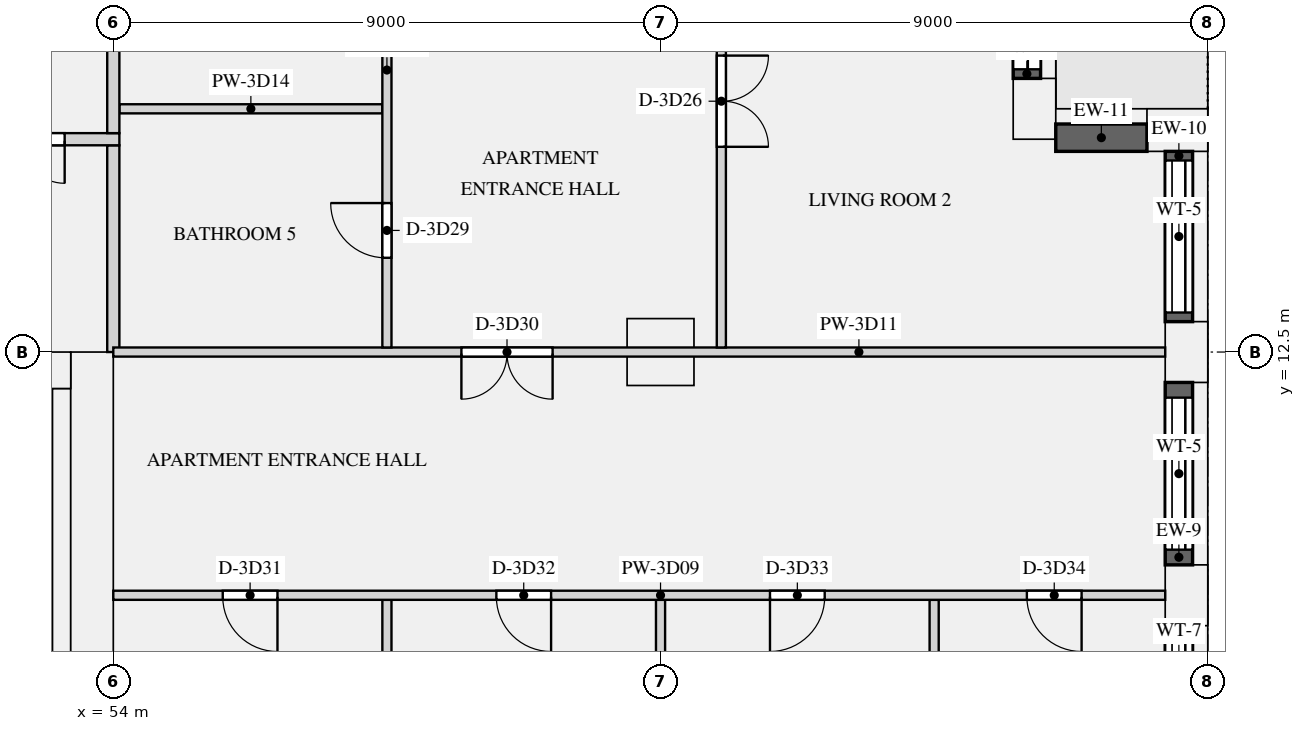
"""IFC4 building model, lengths in metres.
Left out: names, types, materials, properties, quantities, classifications, styles, units other than length and angle.
Written with IfcOpenShell. Run it as: python <this file> out.ifc"""

import sys

from ifc_helpers import new_model, si_unit, direction, frame, frame_2d, origin, origin_2d, place, context, subcontext, project, spatial, rectangle, extrude, element, fill, save


model = new_model("IFC4")
c1 = context("Model", 3, precision=1e-05, world=origin(), true_north=direction((0.0, 1.0)))
c2 = subcontext(c1, "Body", "Model", "MODEL_VIEW")
j1 = project(units=[si_unit("LENGTHUNIT", "METRE"), si_unit("PLANEANGLEUNIT", "RADIAN")], contexts=[c1])
p1 = place(None, origin())
s1 = spatial("IfcSite", under=j1, at=p1, CompositionType="ELEMENT")
p2 = place(p1, origin())
s2 = spatial("IfcBuilding", under=s1, at=p2, CompositionType="ELEMENT")
p3 = place(p2, frame((0.0, 0.0, 166.5)))
s3 = spatial("IfcBuildingStorey", under=s2, at=p3, CompositionType="ELEMENT", Elevation=166.5)
for number, where, z_axis, x_axis in (
    (1, (71.65, 8.5, 0.0), (0.0, 0.0, 1.0), (0.0, 1.0, 0.0)),
    (2, (71.65, 12.5, 0.0), (0.0, 0.0, 1.0), (0.0, 1.0, 0.0)),
    (3, (71.5, 16.15, 0.0), (0.0, 0.0, 1.0), (-1.0, 0.0, 0.0)),
    (4, (69.15, 16.5, 0.0), (0.0, 0.0, 1.0), (0.0, 1.0, 0.0)),
):
    element("IfcColumn", number, at=place(p3, frame(where, z_axis=z_axis, x_axis=x_axis)), inside=s3, PredefinedType="USERDEFINED", context=c2, shape_type="SweptSolid", body=[
        extrude(rectangle(XDim=1.0, YDim=0.7, at=origin_2d()), origin(), (0.0, 0.0, 1.0), 3.15),
    ])
p4 = place(p3, frame((63.0, 12.5, 0.0), z_axis=(0.0, 0.0, 1.0), x_axis=(1.0, 0.0, 0.0)))
e5 = element("IfcColumn", 5, at=p4, inside=s3, PredefinedType="COLUMN", context=c2, shape_type="SweptSolid", body=[
    extrude(rectangle(XDim=1.1, YDim=1.1, at=origin_2d()), origin(), (0.0, 0.0, 1.0), 3.15),
])
p5 = place(p3, frame((53.65, 0.0, 0.0), z_axis=(0.0, 0.0, 1.0), x_axis=(0.0, 1.0, 0.0)))
e6 = element("IfcWall", 6, at=p5, inside=s3, PredefinedType="SHEAR", context=c2, shape_type="SweptSolid", body=[
    extrude(rectangle(XDim=12.5, YDim=0.7, at=frame_2d((6.25, 0.0))), origin(), (0.0, 0.0, 1.0), 3.15),
])
p6 = place(p3, frame((18.7, 12.2, 0.0), z_axis=(0.0, 0.0, 1.0), x_axis=(1.0, 0.0, 0.0)))
e7 = element("IfcWall", 7, at=p6, inside=s3, PredefinedType="SHEAR", context=c2, shape_type="SweptSolid", body=[
    extrude(rectangle(XDim=34.6, YDim=0.6, at=frame_2d((17.3, 0.0))), origin(), (0.0, 0.0, 1.0), 3.15),
])
p7 = place(p6, frame((24.475, 0.0, 0.0)))
e8 = element("IfcOpeningElement", 8, at=p7, cuts=e7, PredefinedType="OPENING", context=c2, shape_type="SweptSolid", body=[
    extrude(rectangle(XDim=1.1, YDim=2.1, at=frame_2d((0.55, 1.05))), frame((0.0, 0.31, 0.0), z_axis=(0.0, -1.0, 0.0), x_axis=(1.0, 0.0, 0.0)), (0.0, 0.0, 1.0), 0.62),
])
p8 = place(p6, frame((26.725, 0.0, 0.0)))
e9 = element("IfcOpeningElement", 9, at=p8, cuts=e7, PredefinedType="OPENING", context=c2, shape_type="SweptSolid", body=[
    extrude(rectangle(XDim=1.1, YDim=2.1, at=frame_2d((0.55, 1.05))), frame((0.0, 0.31, 0.0), z_axis=(0.0, -1.0, 0.0), x_axis=(1.0, 0.0, 0.0)), (0.0, 0.0, 1.0), 0.62),
])
p9 = place(p6, frame((28.975, 0.0, 0.0)))
e10 = element("IfcOpeningElement", 10, at=p9, cuts=e7, PredefinedType="OPENING", context=c2, shape_type="SweptSolid", body=[
    extrude(rectangle(XDim=1.1, YDim=2.1, at=frame_2d((0.55, 1.05))), frame((0.0, 0.31, 0.0), z_axis=(0.0, -1.0, 0.0), x_axis=(1.0, 0.0, 0.0)), (0.0, 0.0, 1.0), 0.62),
])
p10 = place(p6, frame((8.85, 0.0, 0.0)))
e11 = element("IfcOpeningElement", 11, at=p10, cuts=e7, PredefinedType="OPENING", context=c2, shape_type="SweptSolid", body=[
    extrude(rectangle(XDim=0.9, YDim=2.1, at=frame_2d((0.45, 1.05))), frame((0.0, 0.31, 0.0), z_axis=(0.0, -1.0, 0.0), x_axis=(1.0, 0.0, 0.0)), (0.0, 0.0, 1.0), 0.62),
])
p11 = place(p6, frame((1.45, 0.0, 0.0)))
e12 = element("IfcOpeningElement", 12, at=p11, cuts=e7, PredefinedType="OPENING", context=c2, shape_type="SweptSolid", body=[
    extrude(rectangle(XDim=1.2, YDim=2.1, at=frame_2d((0.6, 1.05))), frame((0.0, 0.31, 0.0), z_axis=(0.0, -1.0, 0.0), x_axis=(1.0, 0.0, 0.0)), (0.0, 0.0, 1.0), 0.62),
])
p12 = place(p6, frame((31.95, 0.0, 0.0)))
e13 = element("IfcOpeningElement", 13, at=p12, cuts=e7, PredefinedType="OPENING", context=c2, shape_type="SweptSolid", body=[
    extrude(rectangle(XDim=1.2, YDim=2.1, at=frame_2d((0.6, 1.05))), frame((0.0, 0.31, 0.0), z_axis=(0.0, -1.0, 0.0), x_axis=(1.0, 0.0, 0.0)), (0.0, 0.0, 1.0), 0.62),
])
p13 = place(p3, frame((53.15, 1.0, 0.0), z_axis=(0.0, 0.0, 1.0), x_axis=(0.0, 1.0, 0.0)))
e14 = element("IfcWall", 14, at=p13, inside=s3, PredefinedType="SHEAR", context=c2, shape_type="SweptSolid", body=[
    extrude(rectangle(XDim=10.9, YDim=0.3, at=frame_2d((5.45, 0.0))), origin(), (0.0, 0.0, 1.0), 3.15),
])
p14 = place(p3, frame((71.525, 5.5, 0.9), z_axis=(0.0, 0.0, 1.0), x_axis=(0.0, 1.0, 0.0)))
e15 = element("IfcWall", 15, at=p14, inside=s3, PredefinedType="SOLIDWALL", context=c2, shape_type="SweptSolid", body=[
    extrude(rectangle(XDim=2.5, YDim=0.45, at=frame_2d((1.25, 0.0))), origin(), (0.0, 0.0, 1.0), 1.93),
])
p15 = place(p14, frame((0.25, 0.0, 0.15)))
e16 = element("IfcOpeningElement", 16, at=p15, cuts=e15, PredefinedType="OPENING", context=c2, shape_type="SweptSolid", body=[
    extrude(rectangle(XDim=2.0, YDim=1.5, at=frame_2d((1.0, 0.75))), frame((0.0, 0.235, 0.0), z_axis=(0.0, -1.0, 0.0), x_axis=(1.0, 0.0, 0.0)), (0.0, 0.0, 1.0), 0.47),
])
p16 = place(p3, frame((71.525, 9.0, 0.9), z_axis=(0.0, 0.0, 1.0), x_axis=(0.0, 1.0, 0.0)))
e17 = element("IfcWall", 17, at=p16, inside=s3, PredefinedType="SOLIDWALL", context=c2, shape_type="SweptSolid", body=[
    extrude(rectangle(XDim=3.0, YDim=0.45, at=frame_2d((1.5, 0.0))), origin(), (0.0, 0.0, 1.0), 1.93),
])
p17 = place(p16, frame((0.25, 0.0, 0.15)))
e18 = element("IfcOpeningElement", 18, at=p17, cuts=e17, PredefinedType="OPENING", context=c2, shape_type="SweptSolid", body=[
    extrude(rectangle(XDim=2.5, YDim=1.5, at=frame_2d((1.25, 0.75))), frame((0.0, 0.235, 0.0), z_axis=(0.0, -1.0, 0.0), x_axis=(1.0, 0.0, 0.0)), (0.0, 0.0, 1.0), 0.47),
])
p18 = place(p3, frame((71.525, 13.0, 0.9), z_axis=(0.0, 0.0, 1.0), x_axis=(0.0, 1.0, 0.0)))
e19 = element("IfcWall", 19, at=p18, inside=s3, PredefinedType="SOLIDWALL", context=c2, shape_type="SweptSolid", body=[
    extrude(rectangle(XDim=2.8, YDim=0.45, at=frame_2d((1.4, 0.0))), origin(), (0.0, 0.0, 1.0), 1.93),
])
p19 = place(p18, frame((0.15, 0.0, 0.15)))
e20 = element("IfcOpeningElement", 20, at=p19, cuts=e19, PredefinedType="OPENING", context=c2, shape_type="SweptSolid", body=[
    extrude(rectangle(XDim=2.5, YDim=1.5, at=frame_2d((1.25, 0.75))), frame((0.0, 0.235, 0.0), z_axis=(0.0, -1.0, 0.0), x_axis=(1.0, 0.0, 0.0)), (0.0, 0.0, 1.0), 0.47),
])
p20 = place(p3, frame((71.0, 16.025, 0.9), z_axis=(0.0, 0.0, 1.0), x_axis=(-1.0, 0.0, 0.0)))
e21 = element("IfcWall", 21, at=p20, inside=s3, PredefinedType="SOLIDWALL", context=c2, shape_type="SweptSolid", body=[
    extrude(rectangle(XDim=1.5, YDim=0.45, at=frame_2d((0.75, 0.0))), origin(), (0.0, 0.0, 1.0), 1.93),
])
p21 = place(p3, frame((69.025, 17.0, 0.0), z_axis=(0.0, 0.0, 1.0), x_axis=(0.0, 1.0, 0.0)))
e22 = element("IfcWall", 22, at=p21, inside=s3, PredefinedType="SOLIDWALL", context=c2, shape_type="SweptSolid", body=[
    extrude(rectangle(XDim=3.0, YDim=0.45, at=frame_2d((1.5, 0.0))), origin(), (0.0, 0.0, 1.0), 2.83),
])
p22 = place(p21, frame((0.15, 0.0, 0.0)))
e23 = element("IfcOpeningElement", 23, at=p22, cuts=e22, PredefinedType="OPENING", context=c2, shape_type="SweptSolid", body=[
    extrude(rectangle(XDim=2.7, YDim=2.3, at=frame_2d((1.35, 1.15))), frame((0.0, 0.235, 0.0), z_axis=(0.0, -1.0, 0.0), x_axis=(1.0, 0.0, 0.0)), (0.0, 0.0, 1.0), 0.47),
])
p23 = place(p3, frame((54.0, 12.5, 0.0), z_axis=(0.0, 0.0, 1.0), x_axis=(0.0, 1.0, 0.0)))
e24 = element("IfcWall", 24, at=p23, inside=s3, PredefinedType="PARTITIONING", context=c2, shape_type="SweptSolid", body=[
    extrude(rectangle(XDim=3.4, YDim=0.2, at=frame_2d((1.7, 0.0))), origin(), (0.0, 0.0, 1.0), 2.83),
])
p24 = place(p3, frame((54.0, 8.5, 0.0), z_axis=(0.0, 0.0, 1.0), x_axis=(1.0, 0.0, 0.0)))
e25 = element("IfcWall", 25, at=p24, inside=s3, PredefinedType="PARTITIONING", context=c2, shape_type="SweptSolid", body=[
    extrude(rectangle(XDim=17.3, YDim=0.15, at=frame_2d((8.65, 0.0))), origin(), (0.0, 0.0, 1.0), 2.83),
])
p25 = place(p24, frame((1.8, 0.0, 0.0)))
e26 = element("IfcOpeningElement", 26, at=p25, cuts=e25, PredefinedType="OPENING", context=c2, shape_type="SweptSolid", body=[
    extrude(rectangle(XDim=0.9, YDim=2.1, at=frame_2d((0.45, 1.05))), frame((0.0, 0.085, 0.0), z_axis=(0.0, -1.0, 0.0), x_axis=(1.0, 0.0, 0.0)), (0.0, 0.0, 1.0), 0.17),
])
p26 = place(p24, frame((6.3, 0.0, 0.0)))
e27 = element("IfcOpeningElement", 27, at=p26, cuts=e25, PredefinedType="OPENING", context=c2, shape_type="SweptSolid", body=[
    extrude(rectangle(XDim=0.9, YDim=2.1, at=frame_2d((0.45, 1.05))), frame((0.0, 0.085, 0.0), z_axis=(0.0, -1.0, 0.0), x_axis=(1.0, 0.0, 0.0)), (0.0, 0.0, 1.0), 0.17),
])
p27 = place(p24, frame((10.8, 0.0, 0.0)))
e28 = element("IfcOpeningElement", 28, at=p27, cuts=e25, PredefinedType="OPENING", context=c2, shape_type="SweptSolid", body=[
    extrude(rectangle(XDim=0.9, YDim=2.1, at=frame_2d((0.45, 1.05))), frame((0.0, 0.085, 0.0), z_axis=(0.0, -1.0, 0.0), x_axis=(1.0, 0.0, 0.0)), (0.0, 0.0, 1.0), 0.17),
])
p28 = place(p24, frame((15.025, 0.0, 0.0)))
e29 = element("IfcOpeningElement", 29, at=p28, cuts=e25, PredefinedType="OPENING", context=c2, shape_type="SweptSolid", body=[
    extrude(rectangle(XDim=0.9, YDim=2.1, at=frame_2d((0.45, 1.05))), frame((0.0, 0.085, 0.0), z_axis=(0.0, -1.0, 0.0), x_axis=(1.0, 0.0, 0.0)), (0.0, 0.0, 1.0), 0.17),
])
p29 = place(p3, frame((54.0, 12.5, 0.0), z_axis=(0.0, 0.0, 1.0), x_axis=(1.0, 0.0, 0.0)))
e30 = element("IfcWall", 30, at=p29, inside=s3, PredefinedType="PARTITIONING", context=c2, shape_type="SweptSolid", body=[
    extrude(rectangle(XDim=17.3, YDim=0.15, at=frame_2d((8.65, 0.0))), origin(), (0.0, 0.0, 1.0), 2.83),
])
p30 = place(p29, frame((5.725, 0.0, 0.0)))
e31 = element("IfcOpeningElement", 31, at=p30, cuts=e30, PredefinedType="OPENING", context=c2, shape_type="SweptSolid", body=[
    extrude(rectangle(XDim=1.5, YDim=2.1, at=frame_2d((0.75, 1.05))), frame((0.0, 0.085, 0.0), z_axis=(0.0, -1.0, 0.0), x_axis=(1.0, 0.0, 0.0)), (0.0, 0.0, 1.0), 0.17),
])
p31 = place(p3, frame((54.1, 16.5, 0.0), z_axis=(0.0, 0.0, 1.0), x_axis=(1.0, 0.0, 0.0)))
e32 = element("IfcWall", 32, at=p31, inside=s3, PredefinedType="PARTITIONING", context=c2, shape_type="SweptSolid", body=[
    extrude(rectangle(XDim=4.325, YDim=0.15, at=frame_2d((2.163, 0.0))), origin(), (0.0, 0.0, 1.0), 2.83),
])
p32 = place(p3, frame((17.9, 16.0, 0.0), z_axis=(0.0, 0.0, 1.0), x_axis=(1.0, 0.0, 0.0)))
e33 = element("IfcWall", 33, at=p32, inside=s3, PredefinedType="PARTITIONING", context=c2, shape_type="SweptSolid", body=[
    extrude(rectangle(XDim=36.2, YDim=0.2, at=frame_2d((18.1, 0.0))), origin(), (0.0, 0.0, 1.0), 2.83),
])
p33 = place(p32, frame((0.9, 0.0, 0.0)))
e34 = element("IfcOpeningElement", 34, at=p33, cuts=e33, PredefinedType="OPENING", context=c2, shape_type="SweptSolid", body=[
    extrude(rectangle(XDim=1.4, YDim=2.1, at=frame_2d((0.7, 1.05))), frame((0.0, 0.11, 0.0), z_axis=(0.0, -1.0, 0.0), x_axis=(1.0, 0.0, 0.0)), (0.0, 0.0, 1.0), 0.22),
])
p34 = place(p32, frame((33.9, 0.0, 0.0)))
e35 = element("IfcOpeningElement", 35, at=p34, cuts=e33, PredefinedType="OPENING", context=c2, shape_type="SweptSolid", body=[
    extrude(rectangle(XDim=1.4, YDim=2.1, at=frame_2d((0.7, 1.05))), frame((0.0, 0.11, 0.0), z_axis=(0.0, -1.0, 0.0), x_axis=(1.0, 0.0, 0.0)), (0.0, 0.0, 1.0), 0.22),
])
p35 = place(p3, frame((54.0, 16.1, 0.0), z_axis=(0.0, 0.0, 1.0), x_axis=(0.0, 1.0, 0.0)))
e36 = element("IfcWall", 36, at=p35, inside=s3, PredefinedType="PARTITIONING", context=c2, shape_type="SweptSolid", body=[
    extrude(rectangle(XDim=7.8, YDim=0.2, at=frame_2d((3.9, 0.0))), origin(), (0.0, 0.0, 1.0), 2.83),
])
p36 = place(p3, frame((58.5, 0.7, 0.0), z_axis=(0.0, 0.0, 1.0), x_axis=(0.0, 1.0, 0.0)))
e37 = element("IfcWall", 37, at=p36, inside=s3, PredefinedType="PARTITIONING", context=c2, shape_type="SweptSolid", body=[
    extrude(rectangle(XDim=7.725, YDim=0.15, at=frame_2d((3.863, 0.0))), origin(), (0.0, 0.0, 1.0), 2.83),
])
p37 = place(p3, frame((58.5, 12.575, 0.0), z_axis=(0.0, 0.0, 1.0), x_axis=(0.0, 1.0, 0.0)))
e38 = element("IfcWall", 38, at=p37, inside=s3, PredefinedType="PARTITIONING", context=c2, shape_type="SweptSolid", body=[
    extrude(rectangle(XDim=10.325, YDim=0.15, at=frame_2d((5.163, 0.0))), origin(), (0.0, 0.0, 1.0), 2.83),
])
p38 = place(p37, frame((6.75, 0.0, 0.0)))
e39 = element("IfcOpeningElement", 39, at=p38, cuts=e38, PredefinedType="OPENING", context=c2, shape_type="SweptSolid", body=[
    extrude(rectangle(XDim=0.9, YDim=2.1, at=frame_2d((0.45, 1.05))), frame((0.0, 0.085, 0.0), z_axis=(0.0, -1.0, 0.0), x_axis=(1.0, 0.0, 0.0)), (0.0, 0.0, 1.0), 0.17),
])
p39 = place(p37, frame((1.475, 0.0, 0.0)))
e40 = element("IfcOpeningElement", 40, at=p39, cuts=e38, PredefinedType="OPENING", context=c2, shape_type="SweptSolid", body=[
    extrude(rectangle(XDim=0.9, YDim=2.1, at=frame_2d((0.45, 1.05))), frame((0.0, 0.085, 0.0), z_axis=(0.0, -1.0, 0.0), x_axis=(1.0, 0.0, 0.0)), (0.0, 0.0, 1.0), 0.17),
])
p40 = place(p3, frame((67.5, 5.2, 0.0), z_axis=(0.0, 0.0, 1.0), x_axis=(0.0, 1.0, 0.0)))
e41 = element("IfcWall", 41, at=p40, inside=s3, PredefinedType="PARTITIONING", context=c2, shape_type="SweptSolid", body=[
    extrude(rectangle(XDim=3.225, YDim=0.15, at=frame_2d((1.613, 0.0))), origin(), (0.0, 0.0, 1.0), 2.83),
])
p41 = place(p3, frame((64.0, 12.575, 0.0), z_axis=(0.0, 0.0, 1.0), x_axis=(0.0, 1.0, 0.0)))
e42 = element("IfcWall", 42, at=p41, inside=s3, PredefinedType="PARTITIONING", context=c2, shape_type="SweptSolid", body=[
    extrude(rectangle(XDim=22.75, YDim=0.15, at=frame_2d((11.375, 0.0))), origin(), (0.0, 0.0, 1.0), 2.83),
])
p42 = place(p41, frame((16.55, 0.0, 0.0)))
e43 = element("IfcOpeningElement", 43, at=p42, cuts=e42, PredefinedType="OPENING", context=c2, shape_type="SweptSolid", body=[
    extrude(rectangle(XDim=1.5, YDim=2.1, at=frame_2d((0.75, 1.05))), frame((0.0, 0.085, 0.0), z_axis=(0.0, -1.0, 0.0), x_axis=(1.0, 0.0, 0.0)), (0.0, 0.0, 1.0), 0.17),
])
p43 = place(p41, frame((3.3, 0.0, 0.0)))
e44 = element("IfcOpeningElement", 44, at=p43, cuts=e42, PredefinedType="OPENING", context=c2, shape_type="SweptSolid", body=[
    extrude(rectangle(XDim=1.5, YDim=2.1, at=frame_2d((0.75, 1.05))), frame((0.0, 0.085, 0.0), z_axis=(0.0, -1.0, 0.0), x_axis=(1.0, 0.0, 0.0)), (0.0, 0.0, 1.0), 0.17),
])
p44 = place(p41, frame((9.1, 0.0, 0.0)))
e45 = element("IfcOpeningElement", 45, at=p44, cuts=e42, PredefinedType="OPENING", context=c2, shape_type="SweptSolid", body=[
    extrude(rectangle(XDim=0.9, YDim=2.1, at=frame_2d((0.45, 1.05))), frame((0.0, 0.085, 0.0), z_axis=(0.0, -1.0, 0.0), x_axis=(1.0, 0.0, 0.0)), (0.0, 0.0, 1.0), 0.17),
])
p45 = place(p3, frame((63.0, 0.7, 0.0), z_axis=(0.0, 0.0, 1.0), x_axis=(0.0, 1.0, 0.0)))
e46 = element("IfcWall", 46, at=p45, inside=s3, PredefinedType="PARTITIONING", context=c2, shape_type="SweptSolid", body=[
    extrude(rectangle(XDim=7.725, YDim=0.15, at=frame_2d((3.863, 0.0))), origin(), (0.0, 0.0, 1.0), 2.83),
])
p46 = place(p15, origin())
e47 = element("IfcWindow", 47, at=p46, inside=s3, PartitioningType="SINGLE_PANEL", PredefinedType="WINDOW", context=c2, shape_type="SweptSolid", body=[
    extrude(rectangle(XDim=2.0, YDim=1.5, at=frame_2d((1.0, 0.75))), frame((0.0, -0.065, 0.0), z_axis=(0.0, -1.0, 0.0), x_axis=(1.0, 0.0, 0.0)), (0.0, 0.0, 1.0), 0.06),
])
fill(e16, e47)
p47 = place(p17, origin())
e48 = element("IfcWindow", 48, at=p47, inside=s3, PartitioningType="SINGLE_PANEL", PredefinedType="WINDOW", context=c2, shape_type="SweptSolid", body=[
    extrude(rectangle(XDim=2.5, YDim=1.5, at=frame_2d((1.25, 0.75))), frame((0.0, -0.065, 0.0), z_axis=(0.0, -1.0, 0.0), x_axis=(1.0, 0.0, 0.0)), (0.0, 0.0, 1.0), 0.06),
])
fill(e18, e48)
p48 = place(p19, origin())
e49 = element("IfcWindow", 49, at=p48, inside=s3, PartitioningType="SINGLE_PANEL", PredefinedType="WINDOW", context=c2, shape_type="SweptSolid", body=[
    extrude(rectangle(XDim=2.5, YDim=1.5, at=frame_2d((1.25, 0.75))), frame((0.0, -0.065, 0.0), z_axis=(0.0, -1.0, 0.0), x_axis=(1.0, 0.0, 0.0)), (0.0, 0.0, 1.0), 0.06),
])
fill(e20, e49)
p49 = place(p22, origin())
e50 = element("IfcDoor", 50, at=p49, inside=s3, OperationType="SLIDING_TO_LEFT", PredefinedType="DOOR", context=c2, shape_type="SweptSolid", body=[
    extrude(rectangle(XDim=2.7, YDim=2.3, at=frame_2d((1.35, 1.15))), frame((0.0, -0.07, 0.0), z_axis=(0.0, -1.0, 0.0), x_axis=(1.0, 0.0, 0.0)), (0.0, 0.0, 1.0), 0.05),
])
fill(e23, e50)
p50 = place(p34, frame((1.4, 0.0, 0.0), z_axis=(0.0, 0.0, 1.0), x_axis=(-1.0, 0.0, 0.0)))
e51 = element("IfcDoor", 51, at=p50, inside=s3, OperationType="DOUBLE_DOOR_SINGLE_SWING", PredefinedType="DOOR", context=c2, shape_type="SweptSolid", body=[
    extrude(rectangle(XDim=1.4, YDim=2.1, at=frame_2d((0.7, 1.05))), frame((0.0, 0.025, 0.0), z_axis=(0.0, -1.0, 0.0), x_axis=(1.0, 0.0, 0.0)), (0.0, 0.0, 1.0), 0.05),
])
fill(e35, e51)
p51 = place(p43, frame((1.5, 0.0, 0.0), z_axis=(0.0, 0.0, 1.0), x_axis=(-1.0, 0.0, 0.0)))
e52 = element("IfcDoor", 52, at=p51, inside=s3, OperationType="DOUBLE_DOOR_SINGLE_SWING", PredefinedType="DOOR", context=c2, shape_type="SweptSolid", body=[
    extrude(rectangle(XDim=1.5, YDim=2.1, at=frame_2d((0.75, 1.05))), frame((0.0, 0.025, 0.0), z_axis=(0.0, -1.0, 0.0), x_axis=(1.0, 0.0, 0.0)), (0.0, 0.0, 1.0), 0.05),
])
fill(e44, e52)
p52 = place(p39, origin())
e53 = element("IfcDoor", 53, at=p52, inside=s3, OperationType="SINGLE_SWING_RIGHT", PredefinedType="DOOR", context=c2, shape_type="SweptSolid", body=[
    extrude(rectangle(XDim=0.9, YDim=2.1, at=frame_2d((0.45, 1.05))), frame((0.0, 0.025, 0.0), z_axis=(0.0, -1.0, 0.0), x_axis=(1.0, 0.0, 0.0)), (0.0, 0.0, 1.0), 0.05),
])
fill(e40, e53)
p53 = place(p30, frame((1.5, 0.0, 0.0), z_axis=(0.0, 0.0, 1.0), x_axis=(-1.0, 0.0, 0.0)))
e54 = element("IfcDoor", 54, at=p53, inside=s3, OperationType="DOUBLE_DOOR_SINGLE_SWING", PredefinedType="DOOR", context=c2, shape_type="SweptSolid", body=[
    extrude(rectangle(XDim=1.5, YDim=2.1, at=frame_2d((0.75, 1.05))), frame((0.0, 0.025, 0.0), z_axis=(0.0, -1.0, 0.0), x_axis=(1.0, 0.0, 0.0)), (0.0, 0.0, 1.0), 0.05),
])
fill(e31, e54)
p54 = place(p25, frame((0.9, 0.0, 0.0), z_axis=(0.0, 0.0, 1.0), x_axis=(-1.0, 0.0, 0.0)))
e55 = element("IfcDoor", 55, at=p54, inside=s3, OperationType="SINGLE_SWING_LEFT", PredefinedType="DOOR", context=c2, shape_type="SweptSolid", body=[
    extrude(rectangle(XDim=0.9, YDim=2.1, at=frame_2d((0.45, 1.05))), frame((0.0, 0.025, 0.0), z_axis=(0.0, -1.0, 0.0), x_axis=(1.0, 0.0, 0.0)), (0.0, 0.0, 1.0), 0.05),
])
fill(e26, e55)
p55 = place(p26, frame((0.9, 0.0, 0.0), z_axis=(0.0, 0.0, 1.0), x_axis=(-1.0, 0.0, 0.0)))
e56 = element("IfcDoor", 56, at=p55, inside=s3, OperationType="SINGLE_SWING_LEFT", PredefinedType="DOOR", context=c2, shape_type="SweptSolid", body=[
    extrude(rectangle(XDim=0.9, YDim=2.1, at=frame_2d((0.45, 1.05))), frame((0.0, 0.025, 0.0), z_axis=(0.0, -1.0, 0.0), x_axis=(1.0, 0.0, 0.0)), (0.0, 0.0, 1.0), 0.05),
])
fill(e27, e56)
p56 = place(p27, frame((0.9, 0.0, 0.0), z_axis=(0.0, 0.0, 1.0), x_axis=(-1.0, 0.0, 0.0)))
e57 = element("IfcDoor", 57, at=p56, inside=s3, OperationType="SINGLE_SWING_RIGHT", PredefinedType="DOOR", context=c2, shape_type="SweptSolid", body=[
    extrude(rectangle(XDim=0.9, YDim=2.1, at=frame_2d((0.45, 1.05))), frame((0.0, 0.025, 0.0), z_axis=(0.0, -1.0, 0.0), x_axis=(1.0, 0.0, 0.0)), (0.0, 0.0, 1.0), 0.05),
])
fill(e28, e57)
p57 = place(p28, frame((0.9, 0.0, 0.0), z_axis=(0.0, 0.0, 1.0), x_axis=(-1.0, 0.0, 0.0)))
e58 = element("IfcDoor", 58, at=p57, inside=s3, OperationType="SINGLE_SWING_LEFT", PredefinedType="DOOR", context=c2, shape_type="SweptSolid", body=[
    extrude(rectangle(XDim=0.9, YDim=2.1, at=frame_2d((0.45, 1.05))), frame((0.0, 0.025, 0.0), z_axis=(0.0, -1.0, 0.0), x_axis=(1.0, 0.0, 0.0)), (0.0, 0.0, 1.0), 0.05),
])
fill(e29, e58)
save(model, sys.argv[1])
